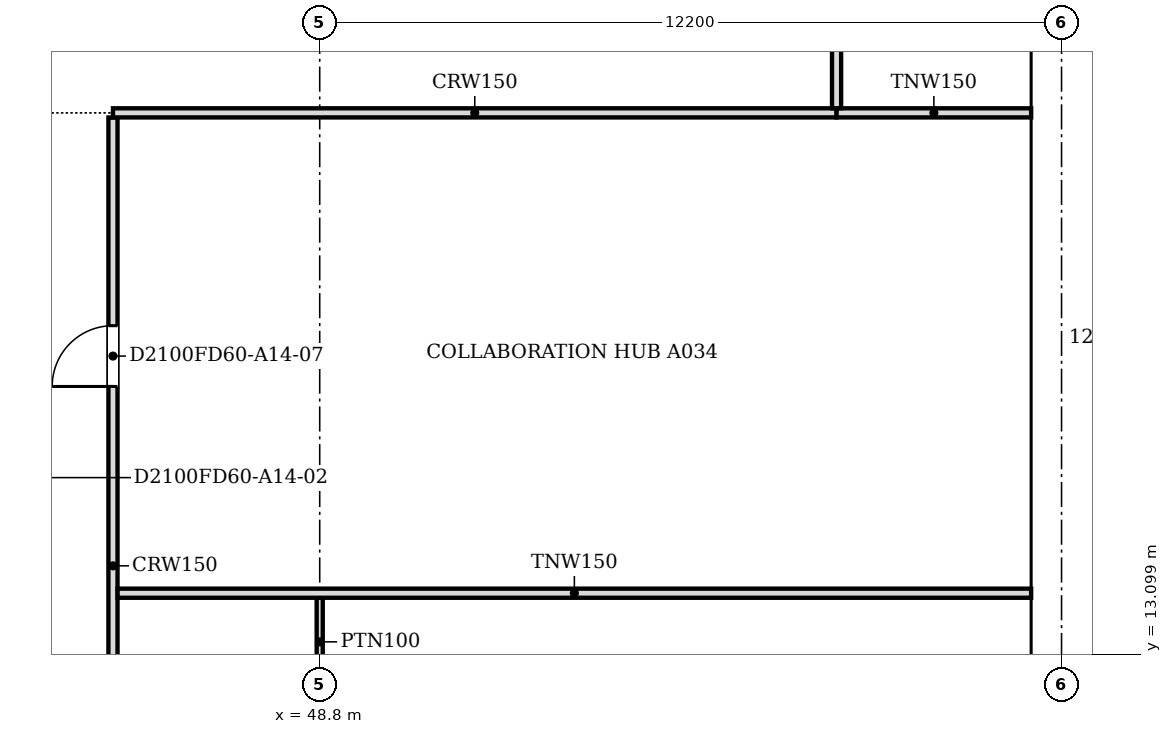
"""IFC4 building model, lengths in metres.
Left out: names, types, materials, properties, quantities, classifications, styles, units other than length and angle.
Written with IfcOpenShell. Run it as: python <this file> out.ifc"""

import sys

from ifc_helpers import new_model, si_unit, direction, frame, frame_2d, origin, place, context, subcontext, project, spatial, polyline, rectangle, outline, extrude, faceted_brep, source, transform, mapped, element, fill, save


model = new_model("IFC4")
c1 = context("Model", 3, precision=1e-05, world=origin(), true_north=direction((0.0, 1.0)))
c2 = subcontext(c1, "Body", "Model", "MODEL_VIEW")
j1 = project(units=[si_unit("LENGTHUNIT", "METRE"), si_unit("PLANEANGLEUNIT", "RADIAN")], contexts=[c1])
p1 = place(None, origin())
s1 = spatial("IfcSite", under=j1, at=p1, CompositionType="ELEMENT")
p2 = place(p1, origin())
s2 = spatial("IfcBuilding", under=s1, at=p2, CompositionType="ELEMENT")
p3 = place(p2, frame((0.0, 0.0, 159.2)))
s3 = spatial("IfcBuildingStorey", under=s2, at=p3, CompositionType="ELEMENT", Elevation=159.2)
m1 = source(origin(), c2, "Body", "SweptSolid", [
    extrude(outline(polyline([(3.05, 0.0), (6.1, 3.8), (3.05, 7.6), (0.0, 3.8), (3.05, 0.0)])), frame((0.0, 0.25, 0.0), z_axis=(0.0, -1.0, 0.0), x_axis=(1.0, 0.0, 0.0)), (0.0, 0.0, 1.0), 0.5),
])
p4 = place(p3, frame((60.75, 9.15, -3.8), z_axis=(0.0, 0.0, 1.0), x_axis=(0.0, 1.0, 0.0)))
e1 = element("IfcWall", 1, at=p4, inside=s3, PredefinedType="SOLIDWALL", context=c2, shape_type="MappedRepresentation", body=[
    mapped(m1, transform((0.0, 0.0, 0.0), scale=1.0)),
])
m2 = source(origin(), c2, "Body", "SweptSolid", [
    extrude(outline(polyline([(3.05, 0.399), (5.78, 3.8), (3.05, 7.201), (0.321, 3.8), (3.05, 0.399)])), frame((0.0, 0.26, 0.0), z_axis=(0.0, -1.0, 0.0), x_axis=(1.0, 0.0, 0.0)), (0.0, 0.0, 1.0), 0.52),
])
p5 = place(p4, origin())
e2 = element("IfcOpeningElement", 2, at=p5, cuts=e1, PredefinedType="OPENING", context=c2, shape_type="MappedRepresentation", body=[
    mapped(m2, transform((0.0, 0.0, 0.0), scale=1.0)),
])
p6 = place(p3, frame((60.75, 15.25, -3.8), z_axis=(0.0, 0.0, 1.0), x_axis=(0.0, 1.0, 0.0)))
e3 = element("IfcWall", 3, at=p6, inside=s3, PredefinedType="SOLIDWALL", context=c2, shape_type="MappedRepresentation", body=[
    mapped(m1, transform((0.0, 0.0, 0.0), scale=1.0)),
])
p7 = place(p6, origin())
e4 = element("IfcOpeningElement", 4, at=p7, cuts=e3, PredefinedType="OPENING", context=c2, shape_type="MappedRepresentation", body=[
    mapped(m2, transform((0.0, 0.0, 0.0), scale=1.0)),
])
m3 = source(origin(), c2, "Body", "Brep", [
    faceted_brep([(3.05, -0.25, 0.0), (6.1, -0.25, 3.8), (6.1, -0.25, 3.8), (3.05, -0.25, 7.6), (0.0, -0.25, 3.8), (0.0, 0.25, 3.8), (3.05, 0.25, 7.6), (6.1, 0.25, 3.8), (6.1, 0.25, 3.8), (3.05, 0.25, 0.0)], [[[0, 1, 2, 3, 4]], [[5, 6, 7, 8, 9]], [[9, 8, 1, 0]], [[7, 6, 3, 2]], [[6, 5, 4, 3]], [[5, 9, 0, 4]], [[1, 8, 7, 2]]]),
])
p8 = place(p3, frame((60.75, 21.35, -3.8), z_axis=(0.0, 0.0, 1.0), x_axis=(0.0, 1.0, 0.0)))
e5 = element("IfcWall", 5, at=p8, inside=s3, PredefinedType="SOLIDWALL", context=c2, shape_type="MappedRepresentation", body=[
    mapped(m3, transform((0.0, 0.0, 0.0), scale=1.0)),
])
p9 = place(p8, origin())
e6 = element("IfcOpeningElement", 6, at=p9, cuts=e5, PredefinedType="OPENING", context=c2, shape_type="MappedRepresentation", body=[
    mapped(m2, transform((0.0, 0.0, 0.0), scale=1.0)),
])
p10 = place(p2, frame((0.0, 0.0, 163.0)))
s4 = spatial("IfcBuildingStorey", under=s2, at=p10, CompositionType="ELEMENT", Elevation=163.0)
p11 = place(p10, frame((60.75, 12.2, -3.8), z_axis=(0.0, 0.0, 1.0), x_axis=(0.0, 1.0, 0.0)))
e7 = element("IfcWall", 7, at=p11, inside=s4, PredefinedType="SOLIDWALL", context=c2, shape_type="MappedRepresentation", body=[
    mapped(m1, transform((0.0, 0.0, 0.0), scale=1.0)),
])
p12 = place(p11, origin())
e8 = element("IfcOpeningElement", 8, at=p12, cuts=e7, PredefinedType="OPENING", context=c2, shape_type="MappedRepresentation", body=[
    mapped(m2, transform((0.0, 0.0, 0.0), scale=1.0)),
])
p13 = place(p10, frame((60.75, 18.3, -3.8), z_axis=(0.0, 0.0, 1.0), x_axis=(0.0, 1.0, 0.0)))
e9 = element("IfcWall", 9, at=p13, inside=s4, PredefinedType="SOLIDWALL", context=c2, shape_type="MappedRepresentation", body=[
    mapped(m3, transform((0.0, 0.0, 0.0), scale=1.0)),
])
p14 = place(p13, origin())
e10 = element("IfcOpeningElement", 10, at=p14, cuts=e9, PredefinedType="OPENING", context=c2, shape_type="MappedRepresentation", body=[
    mapped(m2, transform((0.0, 0.0, 0.0), scale=1.0)),
])
p15 = place(p3, frame((45.4, 21.924, 0.0), z_axis=(0.0, 0.0, 1.0), x_axis=(0.0, -1.0, 0.0)))
e11 = element("IfcWall", 11, at=p15, inside=s3, PredefinedType="PARTITIONING", context=c2, shape_type="SweptSolid", body=[
    extrude(rectangle(XDim=13.824, YDim=0.15, at=frame_2d((6.912, 0.0))), origin(), (0.0, 0.0, 1.0), 3.067),
])
m4 = source(origin(), c2, "Body", "SweptSolid", [
    extrude(rectangle(XDim=1.0, YDim=2.1, at=frame_2d((0.5, 1.05))), frame((0.0, 0.085, 0.0), z_axis=(0.0, -1.0, 0.0), x_axis=(1.0, 0.0, 0.0)), (0.0, 0.0, 1.0), 0.17),
])
p16 = place(p15, frame((10.324, 0.0, 0.0)))
e12 = element("IfcOpeningElement", 12, at=p16, cuts=e11, PredefinedType="OPENING", context=c2, shape_type="MappedRepresentation", body=[
    mapped(m4, transform((0.0, 0.0, 0.0), scale=1.0)),
])
p17 = place(p15, frame((3.424, 0.0, 0.0)))
e13 = element("IfcOpeningElement", 13, at=p17, cuts=e11, PredefinedType="OPENING", context=c2, shape_type="MappedRepresentation", body=[
    mapped(m4, transform((0.0, 0.0, 0.0), scale=1.0)),
])
p18 = place(p3, frame((48.8, 12.575, 0.0), z_axis=(0.0, 0.0, 1.0), x_axis=(0.0, 1.0, 0.0)))
e14 = element("IfcWall", 14, at=p18, inside=s3, PredefinedType="PARTITIONING", context=c2, shape_type="SweptSolid", body=[
    extrude(rectangle(XDim=1.45, YDim=0.1, at=frame_2d((0.725, 0.0))), origin(), (0.0, 0.0, 1.0), 3.067),
])
p19 = place(p3, frame((45.476, 14.1, 0.0), z_axis=(0.0, 0.0, 1.0), x_axis=(1.0, 0.0, 0.0)))
e15 = element("IfcWall", 15, at=p19, inside=s3, PredefinedType="PARTITIONING", context=c2, shape_type="SweptSolid", body=[
    extrude(rectangle(XDim=15.024, YDim=0.15, at=frame_2d((7.512, 0.0))), origin(), (0.0, 0.0, 1.0), 3.067),
])
p20 = place(p3, frame((45.4, 22.0, 0.0), z_axis=(0.0, 0.0, 1.0), x_axis=(1.0, 0.0, 0.0)))
e16 = element("IfcWall", 16, at=p20, inside=s3, PredefinedType="PARTITIONING", context=c2, shape_type="SweptSolid", body=[
    extrude(rectangle(XDim=11.9, YDim=0.15, at=frame_2d((5.95, 0.0))), origin(), (0.0, 0.0, 1.0), 3.067),
])
p21 = place(p3, frame((57.301, 22.0, 0.0), z_axis=(0.0, 0.0, 1.0), x_axis=(1.0, 0.0, 0.0)))
e17 = element("IfcWall", 17, at=p21, inside=s3, PredefinedType="PARTITIONING", context=c2, shape_type="SweptSolid", body=[
    extrude(rectangle(XDim=3.199, YDim=0.15, at=frame_2d((1.6, 0.0))), origin(), (0.0, 0.0, 1.0), 3.067),
])
p22 = place(p3, frame((57.3, 30.6, 0.0), z_axis=(0.0, 0.0, 1.0), x_axis=(0.0, -1.0, 0.0)))
e18 = element("IfcWall", 18, at=p22, inside=s3, PredefinedType="PARTITIONING", context=c2, shape_type="SweptSolid", body=[
    extrude(rectangle(XDim=8.524, YDim=0.15, at=frame_2d((4.262, 0.0))), origin(), (0.0, 0.0, 1.0), 3.067),
])
m5 = source(origin(), c2, "Body", "SweptSolid", [
    extrude(rectangle(XDim=0.9, YDim=2.1, at=frame_2d((0.45, 1.05))), frame((0.0, 0.085, 0.0), z_axis=(0.0, -1.0, 0.0), x_axis=(1.0, 0.0, 0.0)), (0.0, 0.0, 1.0), 0.17),
])
p23 = place(p22, frame((3.824, 0.0, 0.0)))
e19 = element("IfcOpeningElement", 19, at=p23, cuts=e18, PredefinedType="OPENING", context=c2, shape_type="MappedRepresentation", body=[
    mapped(m5, transform((0.0, 0.0, 0.0), scale=1.0)),
])
m6 = source(origin(), c2, "Body", "SweptSolid", [
    extrude(rectangle(XDim=1.0, YDim=2.1, at=frame_2d((0.5, 1.05))), frame((0.0, 0.025, 0.0), z_axis=(0.0, -1.0, 0.0), x_axis=(1.0, 0.0, 0.0)), (0.0, 0.0, 1.0), 0.05),
])
p24 = place(p17, origin())
e20 = element("IfcDoor", 20, at=p24, inside=s3, OperationType="SINGLE_SWING_RIGHT", PredefinedType="DOOR", context=c2, shape_type="MappedRepresentation", body=[
    mapped(m6, transform((0.0, 0.0, 0.0), scale=1.0)),
])
fill(e13, e20)
save(model, sys.argv[1])
